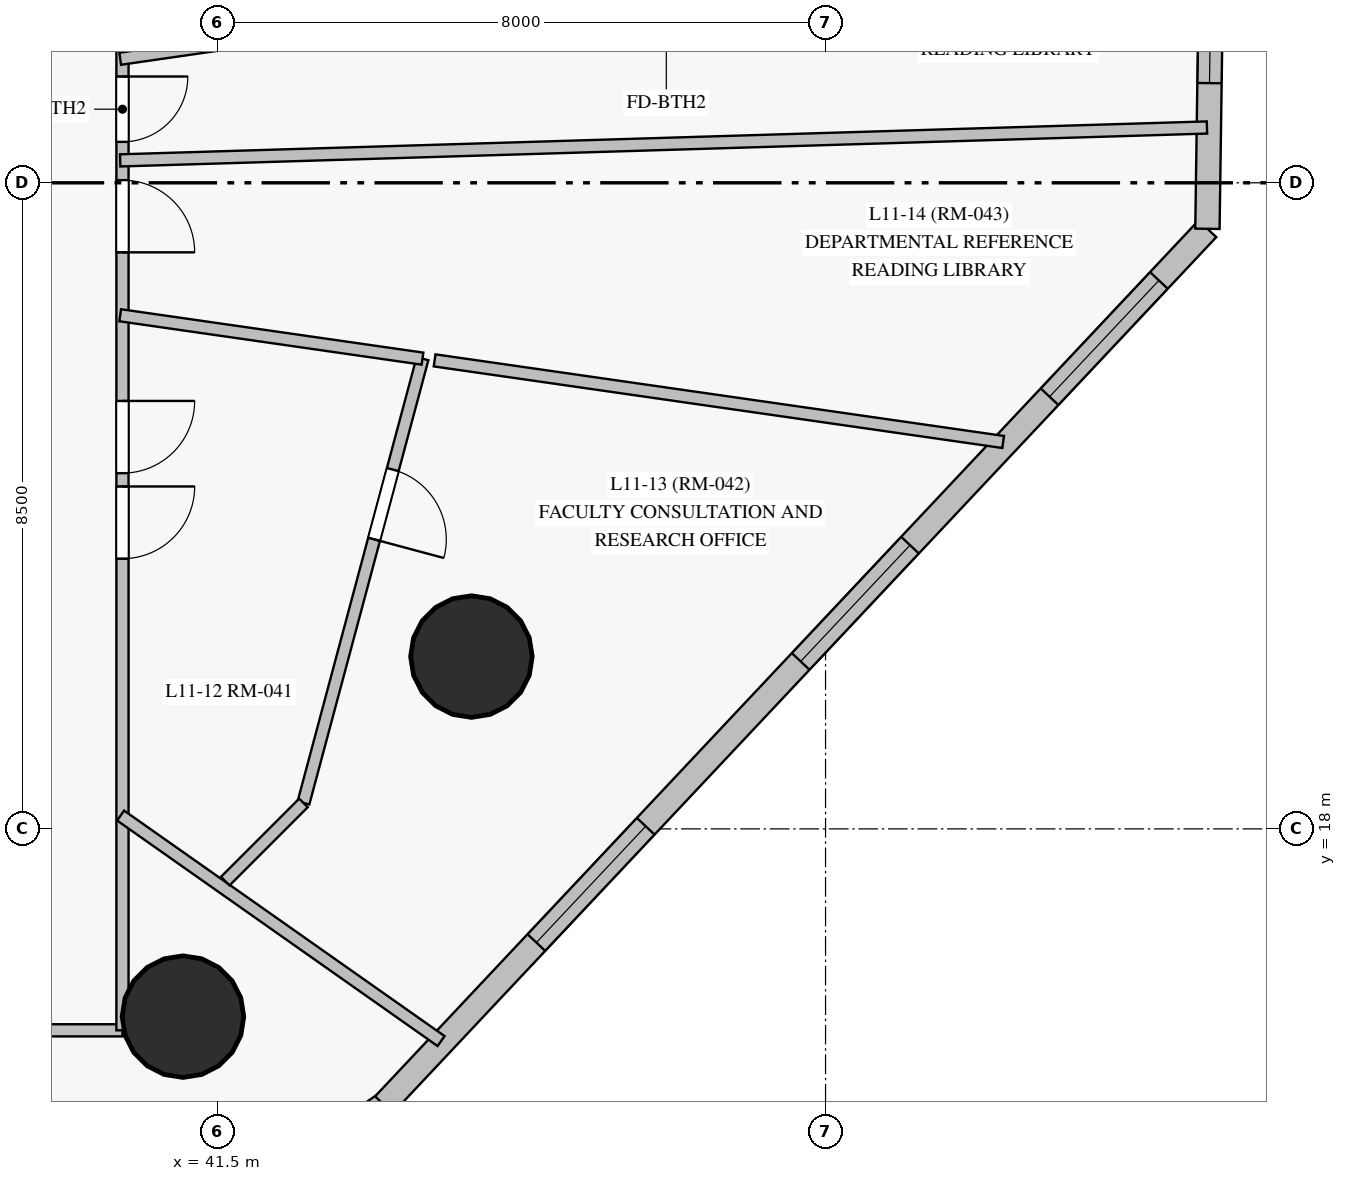
"""IFC4 building model, lengths in metres.
Left out: names, types, materials, properties, quantities, classifications, styles, units other than length and angle.
Written with IfcOpenShell. Run it as: python <this file> out.ifc"""

import sys

from ifc_helpers import new_model, si_unit, direction, frame, frame_2d, origin, origin_with_axes, origin_2d, place, context, subcontext, project, spatial, rectangle, circle, extrude, source, transform, mapped, element, fill, save


model = new_model("IFC4")
c1 = context("Model", 3, precision=1e-05, world=origin(), true_north=direction((0.0, 1.0)))
c2 = subcontext(c1, "Body", "Model", "MODEL_VIEW")
j1 = project(units=[si_unit("LENGTHUNIT", "METRE"), si_unit("PLANEANGLEUNIT", "RADIAN")], contexts=[c1])
p1 = place(None, origin())
s1 = spatial("IfcSite", under=j1, at=p1, CompositionType="ELEMENT")
p2 = place(p1, origin())
s2 = spatial("IfcBuilding", under=s1, at=p2, CompositionType="ELEMENT")
p3 = place(p2, frame((0.0, 0.0, 44.5)))
s3 = spatial("IfcBuildingStorey", under=s2, at=p3, CompositionType="ELEMENT", Elevation=44.5)
m1 = source(origin_with_axes(), c2, "Body", "SweptSolid", [
    extrude(circle(Radius=0.8, at=origin_2d()), origin(), (0.0, 0.0, 1.0), 3.6),
])
for number, where, z_axis, x_axis in (
    (1, (44.841, 20.267, 0.0), (0.0, 0.0, 1.0), (1.0, 0.0, 0.0)),
    (2, (41.046, 15.53, 0.0), (0.0, 0.0, 1.0), (1.0, 0.0, 0.0)),
):
    element("IfcColumn", number, at=place(p3, frame(where, z_axis=z_axis, x_axis=x_axis)), inside=s3, PredefinedType="COLUMN", context=c2, shape_type="MappedRepresentation", body=[
        mapped(m1, transform((0.0, 0.0, 0.0), scale=1.0)),
    ])
p4 = place(p3, frame((34.676, 8.069, 0.0), z_axis=(0.0, 0.0, 1.0), x_axis=(0.81955194261, 0.573004898203, 0.0)))
e3 = element("IfcWall", 3, at=p4, inside=s3, PredefinedType="SOLIDWALL", context=c2, shape_type="SweptSolid", body=[
    extrude(rectangle(XDim=10.999, YDim=0.32, at=frame_2d((5.499, 0.0))), origin(), (0.0, 0.0, 1.0), 3.35),
])
p5 = place(p4, frame((1.036, 0.0, 0.85)))
e4 = element("IfcOpeningElement", 4, at=p5, cuts=e3, PredefinedType="OPENING", context=c2, shape_type="SweptSolid", body=[
    extrude(rectangle(XDim=2.1, YDim=1.95, at=frame_2d((1.05, 0.975))), frame((0.0, 0.17, 0.0), z_axis=(0.0, -1.0, 0.0), x_axis=(1.0, 0.0, 0.0)), (0.0, 0.0, 1.0), 0.34),
])
p6 = place(p4, frame((4.449, 0.0, 0.85)))
e5 = element("IfcOpeningElement", 5, at=p6, cuts=e3, PredefinedType="OPENING", context=c2, shape_type="SweptSolid", body=[
    extrude(rectangle(XDim=2.1, YDim=1.95, at=frame_2d((1.05, 0.975))), frame((0.0, 0.17, 0.0), z_axis=(0.0, -1.0, 0.0), x_axis=(1.0, 0.0, 0.0)), (0.0, 0.0, 1.0), 0.34),
])
p7 = place(p4, frame((7.862, 0.0, 0.85)))
e6 = element("IfcOpeningElement", 6, at=p7, cuts=e3, PredefinedType="OPENING", context=c2, shape_type="SweptSolid", body=[
    extrude(rectangle(XDim=2.1, YDim=1.95, at=frame_2d((1.05, 0.975))), frame((0.0, 0.17, 0.0), z_axis=(0.0, -1.0, 0.0), x_axis=(1.0, 0.0, 0.0)), (0.0, 0.0, 1.0), 0.34),
])
p8 = place(p3, frame((43.69, 14.372, 0.0), z_axis=(0.0, 0.0, 1.0), x_axis=(0.684991460833, 0.728551095384, 0.0)))
e7 = element("IfcWall", 7, at=p8, inside=s3, PredefinedType="SOLIDWALL", context=c2, shape_type="SweptSolid", body=[
    extrude(rectangle(XDim=15.817, YDim=0.32, at=frame_2d((7.908, 0.0))), origin(), (0.0, 0.0, 1.0), 3.35),
])
p9 = place(p8, frame((2.928, 0.0, 0.85)))
e8 = element("IfcOpeningElement", 8, at=p9, cuts=e7, PredefinedType="OPENING", context=c2, shape_type="SweptSolid", body=[
    extrude(rectangle(XDim=2.1, YDim=1.95, at=frame_2d((1.05, 0.975))), frame((0.0, 0.17, 0.0), z_axis=(0.0, -1.0, 0.0), x_axis=(1.0, 0.0, 0.0)), (0.0, 0.0, 1.0), 0.34),
])
p10 = place(p8, frame((8.004, 0.0, 0.85)))
e9 = element("IfcOpeningElement", 9, at=p10, cuts=e7, PredefinedType="OPENING", context=c2, shape_type="SweptSolid", body=[
    extrude(rectangle(XDim=2.1, YDim=1.95, at=frame_2d((1.05, 0.975))), frame((0.0, 0.17, 0.0), z_axis=(0.0, -1.0, 0.0), x_axis=(1.0, 0.0, 0.0)), (0.0, 0.0, 1.0), 0.34),
])
p11 = place(p8, frame((12.784, 0.0, 0.85)))
e10 = element("IfcOpeningElement", 10, at=p11, cuts=e7, PredefinedType="OPENING", context=c2, shape_type="SweptSolid", body=[
    extrude(rectangle(XDim=2.1, YDim=1.95, at=frame_2d((1.05, 0.975))), frame((0.0, 0.17, 0.0), z_axis=(0.0, -1.0, 0.0), x_axis=(1.0, 0.0, 0.0)), (0.0, 0.0, 1.0), 0.34),
])
p12 = place(p3, frame((54.524, 25.895, 0.0), z_axis=(0.0, 0.0, 1.0), x_axis=(0.014133027678, 0.999900123777, 0.0)))
e11 = element("IfcWall", 11, at=p12, inside=s3, PredefinedType="SOLIDWALL", context=c2, shape_type="SweptSolid", body=[
    extrude(rectangle(XDim=10.537, YDim=0.32, at=frame_2d((5.269, 0.0))), origin(), (0.0, 0.0, 1.0), 3.35),
])
p13 = place(p12, frame((1.917, 0.0, 0.85)))
e12 = element("IfcOpeningElement", 12, at=p13, cuts=e11, PredefinedType="OPENING", context=c2, shape_type="SweptSolid", body=[
    extrude(rectangle(XDim=1.8, YDim=1.85, at=frame_2d((0.9, 0.925))), frame((0.0, 0.17, 0.0), z_axis=(0.0, -1.0, 0.0), x_axis=(1.0, 0.0, 0.0)), (0.0, 0.0, 1.0), 0.34),
])
p14 = place(p12, frame((7.351, 0.0, 0.85)))
e13 = element("IfcOpeningElement", 13, at=p14, cuts=e11, PredefinedType="OPENING", context=c2, shape_type="SweptSolid", body=[
    extrude(rectangle(XDim=2.1, YDim=1.95, at=frame_2d((1.05, 0.975))), frame((0.0, 0.17, 0.0), z_axis=(0.0, -1.0, 0.0), x_axis=(1.0, 0.0, 0.0)), (0.0, 0.0, 1.0), 0.34),
])
p15 = place(p3, frame((40.25, 15.35, 0.0), z_axis=(0.0, 0.0, 1.0), x_axis=(-1.0, 0.0, 0.0)))
e14 = element("IfcWall", 14, at=p15, inside=s3, PredefinedType="PARTITIONING", context=c2, shape_type="SweptSolid", body=[
    extrude(rectangle(XDim=29.75, YDim=0.16, at=frame_2d((14.875, 0.0))), origin(), (0.0, 0.0, 1.0), 2.7),
])
p16 = place(p15, frame((26.423, 0.0, 0.0)))
e15 = element("IfcOpeningElement", 15, at=p16, cuts=e14, PredefinedType="OPENING", context=c2, shape_type="SweptSolid", body=[
    extrude(rectangle(XDim=0.95, YDim=2.15, at=frame_2d((0.475, 1.075))), frame((0.0, 0.09, 0.0), z_axis=(0.0, -1.0, 0.0), x_axis=(1.0, 0.0, 0.0)), (0.0, 0.0, 1.0), 0.18),
])
p17 = place(p15, frame((21.837, 0.0, 0.0)))
e16 = element("IfcOpeningElement", 16, at=p17, cuts=e14, PredefinedType="OPENING", context=c2, shape_type="SweptSolid", body=[
    extrude(rectangle(XDim=0.95, YDim=2.15, at=frame_2d((0.475, 1.075))), frame((0.0, 0.09, 0.0), z_axis=(0.0, -1.0, 0.0), x_axis=(1.0, 0.0, 0.0)), (0.0, 0.0, 1.0), 0.18),
])
p18 = place(p15, frame((18.863, 0.0, 0.0)))
e17 = element("IfcOpeningElement", 17, at=p18, cuts=e14, PredefinedType="OPENING", context=c2, shape_type="SweptSolid", body=[
    extrude(rectangle(XDim=0.95, YDim=2.15, at=frame_2d((0.475, 1.075))), frame((0.0, 0.09, 0.0), z_axis=(0.0, -1.0, 0.0), x_axis=(1.0, 0.0, 0.0)), (0.0, 0.0, 1.0), 0.18),
])
p19 = place(p15, frame((16.388, 0.0, 0.0)))
e18 = element("IfcOpeningElement", 18, at=p19, cuts=e14, PredefinedType="OPENING", context=c2, shape_type="SweptSolid", body=[
    extrude(rectangle(XDim=0.95, YDim=2.15, at=frame_2d((0.475, 1.075))), frame((0.0, 0.09, 0.0), z_axis=(0.0, -1.0, 0.0), x_axis=(1.0, 0.0, 0.0)), (0.0, 0.0, 1.0), 0.18),
])
p20 = place(p15, frame((14.4, 0.0, 0.0)))
e19 = element("IfcOpeningElement", 19, at=p20, cuts=e14, PredefinedType="OPENING", context=c2, shape_type="SweptSolid", body=[
    extrude(rectangle(XDim=0.95, YDim=2.15, at=frame_2d((0.475, 1.075))), frame((0.0, 0.09, 0.0), z_axis=(0.0, -1.0, 0.0), x_axis=(1.0, 0.0, 0.0)), (0.0, 0.0, 1.0), 0.18),
])
p21 = place(p15, frame((12.118, 0.0, 0.0)))
e20 = element("IfcOpeningElement", 20, at=p21, cuts=e14, PredefinedType="OPENING", context=c2, shape_type="SweptSolid", body=[
    extrude(rectangle(XDim=0.95, YDim=2.15, at=frame_2d((0.475, 1.075))), frame((0.0, 0.09, 0.0), z_axis=(0.0, -1.0, 0.0), x_axis=(1.0, 0.0, 0.0)), (0.0, 0.0, 1.0), 0.18),
])
p22 = place(p15, frame((9.938, 0.0, 0.0)))
e21 = element("IfcOpeningElement", 21, at=p22, cuts=e14, PredefinedType="OPENING", context=c2, shape_type="SweptSolid", body=[
    extrude(rectangle(XDim=0.95, YDim=2.15, at=frame_2d((0.475, 1.075))), frame((0.0, 0.09, 0.0), z_axis=(0.0, -1.0, 0.0), x_axis=(1.0, 0.0, 0.0)), (0.0, 0.0, 1.0), 0.18),
])
p23 = place(p15, frame((6.962, 0.0, 0.0)))
e22 = element("IfcOpeningElement", 22, at=p23, cuts=e14, PredefinedType="OPENING", context=c2, shape_type="SweptSolid", body=[
    extrude(rectangle(XDim=0.95, YDim=2.15, at=frame_2d((0.475, 1.075))), frame((0.0, 0.09, 0.0), z_axis=(0.0, -1.0, 0.0), x_axis=(1.0, 0.0, 0.0)), (0.0, 0.0, 1.0), 0.18),
])
p24 = place(p3, frame((40.25, 37.65, 0.0), z_axis=(0.0, 0.0, 1.0), x_axis=(0.0, -1.0, 0.0)))
e23 = element("IfcWall", 23, at=p24, inside=s3, PredefinedType="PARTITIONING", context=c2, shape_type="SweptSolid", body=[
    extrude(rectangle(XDim=22.3, YDim=0.16, at=frame_2d((11.15, 0.0))), origin(), (0.0, 0.0, 1.0), 2.75),
])
p25 = place(p24, frame((14.02, 0.0, 0.0)))
e24 = element("IfcOpeningElement", 24, at=p25, cuts=e23, PredefinedType="OPENING", context=c2, shape_type="SweptSolid", body=[
    extrude(rectangle(XDim=0.95, YDim=2.15, at=frame_2d((0.475, 1.075))), frame((0.0, 0.09, 0.0), z_axis=(0.0, -1.0, 0.0), x_axis=(1.0, 0.0, 0.0)), (0.0, 0.0, 1.0), 0.18),
])
p26 = place(p24, frame((11.115, 0.0, 0.0)))
e25 = element("IfcOpeningElement", 25, at=p26, cuts=e23, PredefinedType="OPENING", context=c2, shape_type="SweptSolid", body=[
    extrude(rectangle(XDim=0.95, YDim=2.15, at=frame_2d((0.475, 1.075))), frame((0.0, 0.09, 0.0), z_axis=(0.0, -1.0, 0.0), x_axis=(1.0, 0.0, 0.0)), (0.0, 0.0, 1.0), 0.18),
])
p27 = place(p24, frame((7.397, 0.0, 0.0)))
e26 = element("IfcOpeningElement", 26, at=p27, cuts=e23, PredefinedType="OPENING", context=c2, shape_type="SweptSolid", body=[
    extrude(rectangle(XDim=0.86, YDim=2.1, at=frame_2d((0.43, 1.05))), frame((0.0, 0.09, 0.0), z_axis=(0.0, -1.0, 0.0), x_axis=(1.0, 0.0, 0.0)), (0.0, 0.0, 1.0), 0.18),
])
p28 = place(p24, frame((4.09, 0.0, 0.0)))
e27 = element("IfcOpeningElement", 27, at=p28, cuts=e23, PredefinedType="OPENING", context=c2, shape_type="SweptSolid", body=[
    extrude(rectangle(XDim=0.95, YDim=2.15, at=frame_2d((0.475, 1.075))), frame((0.0, 0.09, 0.0), z_axis=(0.0, -1.0, 0.0), x_axis=(1.0, 0.0, 0.0)), (0.0, 0.0, 1.0), 0.18),
])
p29 = place(p24, frame((2.96, 0.0, 0.0)))
e28 = element("IfcOpeningElement", 28, at=p29, cuts=e23, PredefinedType="OPENING", context=c2, shape_type="SweptSolid", body=[
    extrude(rectangle(XDim=0.95, YDim=2.15, at=frame_2d((0.475, 1.075))), frame((0.0, 0.09, 0.0), z_axis=(0.0, -1.0, 0.0), x_axis=(1.0, 0.0, 0.0)), (0.0, 0.0, 1.0), 0.18),
])
p30 = place(p24, frame((0.681, 0.0, 0.0)))
e29 = element("IfcOpeningElement", 29, at=p30, cuts=e23, PredefinedType="OPENING", context=c2, shape_type="SweptSolid", body=[
    extrude(rectangle(XDim=0.95, YDim=2.15, at=frame_2d((0.475, 1.075))), frame((0.0, 0.09, 0.0), z_axis=(0.0, -1.0, 0.0), x_axis=(1.0, 0.0, 0.0)), (0.0, 0.0, 1.0), 0.18),
])
p31 = place(p24, frame((15.145, 0.0, 0.0)))
e30 = element("IfcOpeningElement", 30, at=p31, cuts=e23, PredefinedType="OPENING", context=c2, shape_type="SweptSolid", body=[
    extrude(rectangle(XDim=0.95, YDim=2.15, at=frame_2d((0.475, 1.075))), frame((0.0, 0.09, 0.0), z_axis=(0.0, -1.0, 0.0), x_axis=(1.0, 0.0, 0.0)), (0.0, 0.0, 1.0), 0.18),
])
p32 = place(p24, frame((9.752, 0.0, 0.0)))
e31 = element("IfcOpeningElement", 31, at=p32, cuts=e23, PredefinedType="OPENING", context=c2, shape_type="SweptSolid", body=[
    extrude(rectangle(XDim=0.86, YDim=2.04, at=frame_2d((0.43, 1.02))), frame((0.0, 0.09, 0.0), z_axis=(0.0, -1.0, 0.0), x_axis=(1.0, 0.0, 0.0)), (0.0, 0.0, 1.0), 0.18),
])
p33 = place(p3, frame((40.22, 28.132, 0.0), z_axis=(0.0, 0.0, 1.0), x_axis=(0.989731959594, 0.142935818315, 0.0)))
e32 = element("IfcWall", 32, at=p33, inside=s3, PredefinedType="PARTITIONING", context=c2, shape_type="SweptSolid", body=[
    extrude(rectangle(XDim=14.488, YDim=0.16, at=frame_2d((7.244, 0.0))), origin(), (0.0, 0.0, 1.0), 3.35),
])
p34 = place(p33, frame((6.751, 0.0, 0.0)))
e33 = element("IfcOpeningElement", 33, at=p34, cuts=e32, PredefinedType="OPENING", context=c2, shape_type="SweptSolid", body=[
    extrude(rectangle(XDim=0.95, YDim=2.15, at=frame_2d((0.475, 1.075))), frame((0.0, 0.09, 0.0), z_axis=(0.0, -1.0, 0.0), x_axis=(1.0, 0.0, 0.0)), (0.0, 0.0, 1.0), 0.18),
])
p35 = place(p3, frame((40.22, 26.795, 0.0), z_axis=(0.0, 0.0, 1.0), x_axis=(0.999542039946, 0.030260706865, 0.0)))
e34 = element("IfcWall", 34, at=p35, inside=s3, PredefinedType="PARTITIONING", context=c2, shape_type="SweptSolid", body=[
    extrude(rectangle(XDim=14.304, YDim=0.16, at=frame_2d((7.152, 0.0))), origin(), (0.0, 0.0, 1.0), 3.35),
])
p36 = place(p3, frame((44.357, 24.164, 0.0), z_axis=(0.0, 0.0, 1.0), x_axis=(0.989858179143, -0.142059090466, 0.0)))
e35 = element("IfcWall", 35, at=p36, inside=s3, PredefinedType="PARTITIONING", context=c2, shape_type="SweptSolid", body=[
    extrude(rectangle(XDim=7.557, YDim=0.16, at=frame_2d((3.778, 0.0))), origin(), (0.0, 0.0, 1.0), 3.35),
])
p37 = place(p3, frame((44.197, 24.187, 0.0), z_axis=(0.0, 0.0, 1.0), x_axis=(-0.258810027393, -0.965928242532, 0.0)))
e36 = element("IfcWall", 36, at=p37, inside=s3, PredefinedType="PARTITIONING", context=c2, shape_type="SweptSolid", body=[
    extrude(rectangle(XDim=6.052, YDim=0.16, at=frame_2d((3.026, 0.0))), origin(), (0.0, 0.0, 1.0), 2.75),
])
p38 = place(p37, frame((1.511, 0.0, 0.0)))
e37 = element("IfcOpeningElement", 37, at=p38, cuts=e36, PredefinedType="OPENING", context=c2, shape_type="SweptSolid", body=[
    extrude(rectangle(XDim=0.95, YDim=2.15, at=frame_2d((0.475, 1.075))), frame((0.0, 0.09, 0.0), z_axis=(0.0, -1.0, 0.0), x_axis=(1.0, 0.0, 0.0)), (0.0, 0.0, 1.0), 0.18),
])
p39 = place(p3, frame((40.226, 18.176, 0.0), z_axis=(0.0, 0.0, 1.0), x_axis=(0.817812197712, -0.575485194661, 0.0)))
e38 = element("IfcWall", 38, at=p39, inside=s3, PredefinedType="PARTITIONING", context=c2, shape_type="SweptSolid", body=[
    extrude(rectangle(XDim=5.155, YDim=0.16, at=frame_2d((2.578, 0.0))), origin(), (0.0, 0.0, 1.0), 3.35),
])
p40 = place(p3, frame((40.22, 24.757, 0.0), z_axis=(0.0, 0.0, 1.0), x_axis=(0.989856920195, -0.142067862456, 0.0)))
e39 = element("IfcWall", 39, at=p40, inside=s3, PredefinedType="PARTITIONING", context=c2, shape_type="SweptSolid", body=[
    extrude(rectangle(XDim=4.018, YDim=0.16, at=frame_2d((2.009, 0.0))), origin(), (0.0, 0.0, 1.0), 3.35),
])
p41 = place(p3, frame((42.631, 18.341, 0.0), z_axis=(0.0, 0.0, 1.0), x_axis=(-0.707190705793, -0.707022846618, 0.0)))
e40 = element("IfcWall", 40, at=p41, inside=s3, PredefinedType="PARTITIONING", context=c2, shape_type="SweptSolid", body=[
    extrude(rectangle(XDim=1.454, YDim=0.16, at=frame_2d((0.727, 0.0))), origin(), (0.0, 0.0, 1.0), 2.75),
])
m2 = source(origin_with_axes(), c2, "Body", "SweptSolid", [
    extrude(rectangle(XDim=2.1, YDim=1.95, at=frame_2d((1.05, 0.975))), frame((0.0, 0.03, 0.0), z_axis=(0.0, -1.0, 0.0), x_axis=(1.0, 0.0, 0.0)), (0.0, 0.0, 1.0), 0.06),
])
p42 = place(p9, origin())
e41 = element("IfcWindow", 41, at=p42, inside=s3, PartitioningType="SINGLE_PANEL", PredefinedType="WINDOW", context=c2, shape_type="MappedRepresentation", body=[
    mapped(m2, transform((0.0, 0.0, 0.0), scale=1.0)),
])
fill(e8, e41)
p43 = place(p10, origin())
e42 = element("IfcWindow", 42, at=p43, inside=s3, PartitioningType="SINGLE_PANEL", PredefinedType="WINDOW", context=c2, shape_type="MappedRepresentation", body=[
    mapped(m2, transform((0.0, 0.0, 0.0), scale=1.0)),
])
fill(e9, e42)
p44 = place(p11, origin())
e43 = element("IfcWindow", 43, at=p44, inside=s3, PartitioningType="SINGLE_PANEL", PredefinedType="WINDOW", context=c2, shape_type="MappedRepresentation", body=[
    mapped(m2, transform((0.0, 0.0, 0.0), scale=1.0)),
])
fill(e10, e43)
m3 = source(origin_with_axes(), c2, "Body", "SweptSolid", [
    extrude(rectangle(XDim=1.8, YDim=1.85, at=frame_2d((0.9, 0.925))), frame((0.0, 0.03, 0.0), z_axis=(0.0, -1.0, 0.0), x_axis=(1.0, 0.0, 0.0)), (0.0, 0.0, 1.0), 0.06),
])
p45 = place(p13, origin())
e44 = element("IfcWindow", 44, at=p45, inside=s3, PartitioningType="SINGLE_PANEL", PredefinedType="WINDOW", context=c2, shape_type="MappedRepresentation", body=[
    mapped(m3, transform((0.0, 0.0, 0.0), scale=1.0)),
])
fill(e12, e44)
m4 = source(origin_with_axes(), c2, "Body", "SweptSolid", [
    extrude(rectangle(XDim=0.95, YDim=2.15, at=frame_2d((0.475, 1.075))), frame((0.0, 0.025, 0.0), z_axis=(0.0, -1.0, 0.0), x_axis=(1.0, 0.0, 0.0)), (0.0, 0.0, 1.0), 0.05),
])
p46 = place(p25, origin())
e45 = element("IfcDoor", 45, at=p46, inside=s3, OperationType="SINGLE_SWING_LEFT", PredefinedType="DOOR", context=c2, shape_type="MappedRepresentation", body=[
    mapped(m4, transform((0.0, 0.0, 0.0), scale=1.0)),
])
fill(e24, e45)
p47 = place(p26, origin())
e46 = element("IfcDoor", 46, at=p47, inside=s3, OperationType="SINGLE_SWING_RIGHT", PredefinedType="DOOR", context=c2, shape_type="MappedRepresentation", body=[
    mapped(m4, transform((0.0, 0.0, 0.0), scale=1.0)),
])
fill(e25, e46)
p48 = place(p31, origin())
e47 = element("IfcDoor", 47, at=p48, inside=s3, OperationType="SINGLE_SWING_LEFT", PredefinedType="DOOR", context=c2, shape_type="MappedRepresentation", body=[
    mapped(m4, transform((0.0, 0.0, 0.0), scale=1.0)),
])
fill(e30, e47)
p49 = place(p38, origin())
e48 = element("IfcDoor", 48, at=p49, inside=s3, OperationType="SINGLE_SWING_RIGHT", PredefinedType="DOOR", context=c2, shape_type="MappedRepresentation", body=[
    mapped(m4, transform((0.0, 0.0, 0.0), scale=1.0)),
])
fill(e37, e48)
m5 = source(origin_with_axes(), c2, "Body", "SweptSolid", [
    extrude(rectangle(XDim=0.86, YDim=2.04, at=frame_2d((0.43, 1.02))), frame((0.0, 0.025, 0.0), z_axis=(0.0, -1.0, 0.0), x_axis=(1.0, 0.0, 0.0)), (0.0, 0.0, 1.0), 0.05),
])
p50 = place(p32, origin())
e49 = element("IfcDoor", 49, at=p50, inside=s3, OperationType="SINGLE_SWING_LEFT", PredefinedType="DOOR", context=c2, shape_type="MappedRepresentation", body=[
    mapped(m5, transform((0.0, 0.0, 0.0), scale=1.0)),
])
fill(e31, e49)
save(model, sys.argv[1])
